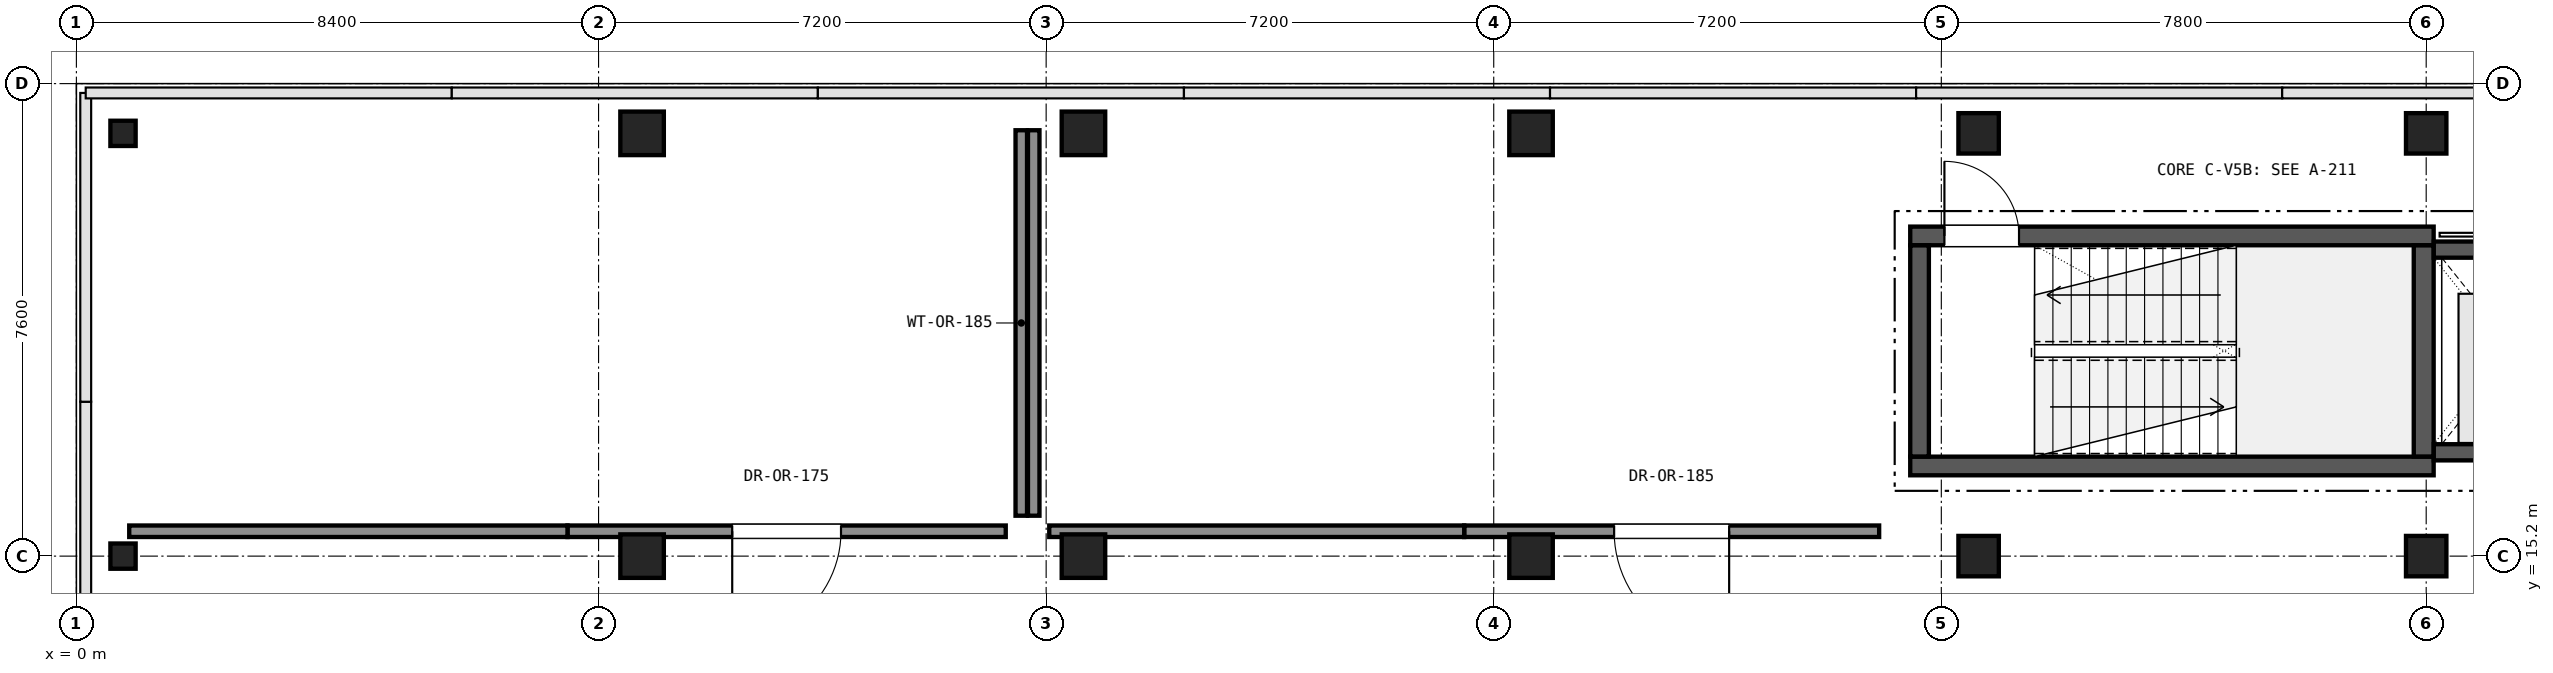
"""IFC4 building model, lengths in metres.
Left out: names, types, materials, properties, quantities, classifications, styles, units other than length and angle.
Written with IfcOpenShell. Run it as: python <this file> out.ifc"""

import sys

from ifc_helpers import new_model, si_unit, direction, frame, frame_2d, origin, origin_2d, place, context, subcontext, project, spatial, rectangle, hollow_circle, extrude, element, fill, save


model = new_model("IFC4")
c1 = context("Model", 3, precision=1e-05, world=origin(), true_north=direction((0.0, 1.0)))
c2 = subcontext(c1, "Body", "Model", "MODEL_VIEW")
j1 = project(units=[si_unit("LENGTHUNIT", "METRE"), si_unit("PLANEANGLEUNIT", "RADIAN")], contexts=[c1])
p1 = place(None, origin())
s1 = spatial("IfcSite", under=j1, at=p1, CompositionType="ELEMENT")
p2 = place(p1, origin())
s2 = spatial("IfcBuilding", under=s1, at=p2, CompositionType="ELEMENT")
p3 = place(p2, frame((0.0, 0.0, 9.52)))
s3 = spatial("IfcBuildingStorey", under=s2, at=p3, CompositionType="ELEMENT", Elevation=9.52)
for number, where, z_axis, x_axis in (
    (1, (0.75, 15.2, 0.0), (0.0, 0.0, 1.0), (1.0, 0.0, 0.0)),
    (2, (0.75, 22.0, 0.0), (0.0, 0.0, 1.0), (1.0, 0.0, 0.0)),
):
    element("IfcColumn", number, at=place(p3, frame(where, z_axis=z_axis, x_axis=x_axis)), inside=s3, PredefinedType="COLUMN", context=c2, shape_type="SweptSolid", body=[
        extrude(hollow_circle(Radius=0.203, WallThickness=0.016, at=origin_2d()), origin(), (0.0, 0.0, 1.0), 4.08),
    ])
for number, where, z_axis, x_axis in (
    (3, (9.1, 15.2, 0.0), (0.0, 0.0, 1.0), (1.0, 0.0, 0.0)),
    (4, (9.1, 22.0, 0.0), (0.0, 0.0, 1.0), (1.0, 0.0, 0.0)),
    (5, (16.2, 15.2, 0.0), (0.0, 0.0, 1.0), (1.0, 0.0, 0.0)),
    (6, (16.2, 22.0, 0.0), (0.0, 0.0, 1.0), (1.0, 0.0, 0.0)),
    (7, (23.4, 15.2, 0.0), (0.0, 0.0, 1.0), (1.0, 0.0, 0.0)),
    (8, (23.4, 22.0, 0.0), (0.0, 0.0, 1.0), (1.0, 0.0, 0.0)),
):
    element("IfcColumn", number, at=place(p3, frame(where, z_axis=z_axis, x_axis=x_axis)), inside=s3, PredefinedType="COLUMN", context=c2, shape_type="SweptSolid", body=[
        extrude(rectangle(XDim=0.7, YDim=0.7, at=origin_2d()), origin(), (0.0, 0.0, 1.0), 4.08),
    ])
for number, where, z_axis, x_axis in (
    (9, (30.6, 15.2, 0.0), (0.0, 0.0, 1.0), (1.0, 0.0, 0.0)),
    (10, (30.6, 22.0, 0.0), (0.0, 0.0, 1.0), (1.0, 0.0, 0.0)),
    (11, (37.8, 15.2, 0.0), (0.0, 0.0, 1.0), (1.0, 0.0, 0.0)),
    (12, (37.8, 22.0, 0.0), (0.0, 0.0, 1.0), (1.0, 0.0, 0.0)),
):
    element("IfcColumn", number, at=place(p3, frame(where, z_axis=z_axis, x_axis=x_axis)), inside=s3, PredefinedType="COLUMN", context=c2, shape_type="SweptSolid", body=[
        extrude(rectangle(XDim=0.65, YDim=0.65, at=origin_2d()), origin(), (0.0, 0.0, 1.0), 4.08),
    ])
p4 = place(p3, frame((29.5, 16.65, 0.0), z_axis=(0.0, 0.0, 1.0), x_axis=(1.0, 0.0, 0.0)))
e13 = element("IfcWall", 13, at=p4, inside=s3, PredefinedType="SHEAR", context=c2, shape_type="SweptSolid", body=[
    extrude(rectangle(XDim=8.42, YDim=0.3, at=frame_2d((4.21, 0.0))), origin(), (0.0, 0.0, 1.0), 3.735),
])
p5 = place(p3, frame((29.5, 20.35, 0.0), z_axis=(0.0, 0.0, 1.0), x_axis=(1.0, 0.0, 0.0)))
e14 = element("IfcWall", 14, at=p5, inside=s3, PredefinedType="SHEAR", context=c2, shape_type="SweptSolid", body=[
    extrude(rectangle(XDim=8.42, YDim=0.3, at=frame_2d((4.21, 0.0))), origin(), (0.0, 0.0, 1.0), 3.735),
])
p6 = place(p5, frame((0.55, 0.0, 0.0)))
e15 = element("IfcOpeningElement", 15, at=p6, cuts=e14, PredefinedType="OPENING", context=c2, shape_type="SweptSolid", body=[
    extrude(rectangle(XDim=1.2, YDim=2.2, at=frame_2d((0.6, 1.1))), frame((0.0, 0.16, 0.0), z_axis=(0.0, -1.0, 0.0), x_axis=(1.0, 0.0, 0.0)), (0.0, 0.0, 1.0), 0.32),
])
p7 = place(p3, frame((29.65, 16.802, 0.0), z_axis=(0.0, 0.0, 1.0), x_axis=(0.0, 1.0, 0.0)))
e16 = element("IfcWall", 16, at=p7, inside=s3, PredefinedType="SHEAR", context=c2, shape_type="SweptSolid", body=[
    extrude(rectangle(XDim=3.396, YDim=0.3, at=frame_2d((1.698, 0.0))), origin(), (0.0, 0.0, 1.0), 3.735),
])
p8 = place(p3, frame((37.76, 16.802, 0.0), z_axis=(0.0, 0.0, 1.0), x_axis=(0.0, 1.0, 0.0)))
e17 = element("IfcWall", 17, at=p8, inside=s3, PredefinedType="SHEAR", context=c2, shape_type="SweptSolid", body=[
    extrude(rectangle(XDim=3.396, YDim=0.32, at=frame_2d((1.698, 0.0))), origin(), (0.0, 0.0, 1.0), 3.735),
])
p9 = place(p3, frame((37.922, 16.87, 0.0), z_axis=(0.0, 0.0, 1.0), x_axis=(1.0, 0.0, 0.0)))
e18 = element("IfcWall", 18, at=p9, inside=s3, PredefinedType="SHEAR", context=c2, shape_type="SweptSolid", body=[
    extrude(rectangle(XDim=2.658, YDim=0.26, at=frame_2d((1.329, 0.0))), origin(), (0.0, 0.0, 1.0), 3.735),
])
p10 = place(p3, frame((37.922, 20.13, 0.0), z_axis=(0.0, 0.0, 1.0), x_axis=(1.0, 0.0, 0.0)))
e19 = element("IfcWall", 19, at=p10, inside=s3, PredefinedType="SHEAR", context=c2, shape_type="SweptSolid", body=[
    extrude(rectangle(XDim=2.658, YDim=0.26, at=frame_2d((1.329, 0.0))), origin(), (0.0, 0.0, 1.0), 3.735),
])
p11 = place(p10, frame((0.679, 0.0, 0.0)))
e20 = element("IfcOpeningElement", 20, at=p11, cuts=e19, PredefinedType="OPENING", context=c2, shape_type="SweptSolid", body=[
    extrude(rectangle(XDim=1.3, YDim=2.2, at=frame_2d((0.65, 1.1))), frame((0.0, 0.14, 0.0), z_axis=(0.0, -1.0, 0.0), x_axis=(1.0, 0.0, 0.0)), (0.0, 0.0, 1.0), 0.28),
])
p12 = place(p3, frame((15.2, 22.05, 0.0), z_axis=(0.0, 0.0, 1.0), x_axis=(0.0, -1.0, 0.0)))
e21 = element("IfcWall", 21, at=p12, inside=s3, PredefinedType="PARTITIONING", context=c2, shape_type="SweptSolid", body=[
    extrude(rectangle(XDim=6.2, YDim=0.185, at=frame_2d((3.1, 0.0))), origin(), (0.0, 0.0, 1.0), 2.785),
])
p13 = place(p3, frame((14.95, 15.6, 0.0), z_axis=(0.0, 0.0, 1.0), x_axis=(-1.0, 0.0, 0.0)))
e22 = element("IfcWall", 22, at=p13, inside=s3, PredefinedType="PARTITIONING", context=c2, shape_type="SweptSolid", body=[
    extrude(rectangle(XDim=7.05, YDim=0.185, at=frame_2d((3.525, 0.0))), origin(), (0.0, 0.0, 1.0), 2.785),
])
p14 = place(p13, frame((2.65, 0.0, 0.0)))
e23 = element("IfcOpeningElement", 23, at=p14, cuts=e22, PredefinedType="OPENING", context=c2, shape_type="SweptSolid", body=[
    extrude(rectangle(XDim=1.75, YDim=2.4, at=frame_2d((0.875, 1.2))), frame((0.0, 0.103, 0.0), z_axis=(0.0, -1.0, 0.0), x_axis=(1.0, 0.0, 0.0)), (0.0, 0.0, 1.0), 0.205),
])
p15 = place(p3, frame((7.9, 15.6, 0.0), z_axis=(0.0, 0.0, 1.0), x_axis=(-1.0, 0.0, 0.0)))
e24 = element("IfcWall", 24, at=p15, inside=s3, PredefinedType="PARTITIONING", context=c2, shape_type="SweptSolid", body=[
    extrude(rectangle(XDim=7.05, YDim=0.185, at=frame_2d((3.525, 0.0))), origin(), (0.0, 0.0, 1.0), 2.785),
])
p16 = place(p3, frame((29.0, 15.6, 0.0), z_axis=(0.0, 0.0, 1.0), x_axis=(-1.0, 0.0, 0.0)))
e25 = element("IfcWall", 25, at=p16, inside=s3, PredefinedType="PARTITIONING", context=c2, shape_type="SweptSolid", body=[
    extrude(rectangle(XDim=6.675, YDim=0.185, at=frame_2d((3.337, 0.0))), origin(), (0.0, 0.0, 1.0), 2.785),
])
p17 = place(p16, frame((2.413, 0.0, 0.0)))
e26 = element("IfcOpeningElement", 26, at=p17, cuts=e25, PredefinedType="OPENING", context=c2, shape_type="SweptSolid", body=[
    extrude(rectangle(XDim=1.85, YDim=2.4, at=frame_2d((0.925, 1.2))), frame((0.0, 0.103, 0.0), z_axis=(0.0, -1.0, 0.0), x_axis=(1.0, 0.0, 0.0)), (0.0, 0.0, 1.0), 0.205),
])
p18 = place(p3, frame((22.325, 15.6, 0.0), z_axis=(0.0, 0.0, 1.0), x_axis=(-1.0, 0.0, 0.0)))
e27 = element("IfcWall", 27, at=p18, inside=s3, PredefinedType="PARTITIONING", context=c2, shape_type="SweptSolid", body=[
    extrude(rectangle(XDim=6.675, YDim=0.185, at=frame_2d((3.337, 0.0))), origin(), (0.0, 0.0, 1.0), 2.785),
])
p19 = place(p3, frame((15.4, 15.85, 0.0), z_axis=(0.0, 0.0, 1.0), x_axis=(0.0, 1.0, 0.0)))
e28 = element("IfcWall", 28, at=p19, inside=s3, PredefinedType="PARTITIONING", context=c2, shape_type="SweptSolid", body=[
    extrude(rectangle(XDim=6.2, YDim=0.185, at=frame_2d((3.1, 0.0))), origin(), (0.0, 0.0, 1.0), 2.785),
])
p20 = place(p6, origin())
e29 = element("IfcDoor", 29, at=p20, inside=s3, OperationType="SINGLE_SWING_LEFT", PredefinedType="DOOR", context=c2, shape_type="SweptSolid", body=[
    extrude(rectangle(XDim=1.2, YDim=2.2, at=frame_2d((0.6, 1.1))), frame((0.0, 0.025, 0.0), z_axis=(0.0, -1.0, 0.0), x_axis=(1.0, 0.0, 0.0)), (0.0, 0.0, 1.0), 0.05),
])
fill(e15, e29)
p21 = place(p14, origin())
e30 = element("IfcDoor", 30, at=p21, inside=s3, OperationType="SINGLE_SWING_RIGHT", PredefinedType="DOOR", context=c2, shape_type="SweptSolid", body=[
    extrude(rectangle(XDim=1.75, YDim=2.4, at=frame_2d((0.875, 1.2))), frame((0.0, 0.025, 0.0), z_axis=(0.0, -1.0, 0.0), x_axis=(1.0, 0.0, 0.0)), (0.0, 0.0, 1.0), 0.05),
])
fill(e23, e30)
p22 = place(p17, origin())
e31 = element("IfcDoor", 31, at=p22, inside=s3, OperationType="SINGLE_SWING_LEFT", PredefinedType="DOOR", context=c2, shape_type="SweptSolid", body=[
    extrude(rectangle(XDim=1.85, YDim=2.4, at=frame_2d((0.925, 1.2))), frame((0.0, 0.025, 0.0), z_axis=(0.0, -1.0, 0.0), x_axis=(1.0, 0.0, 0.0)), (0.0, 0.0, 1.0), 0.05),
])
fill(e26, e31)
save(model, sys.argv[1])
